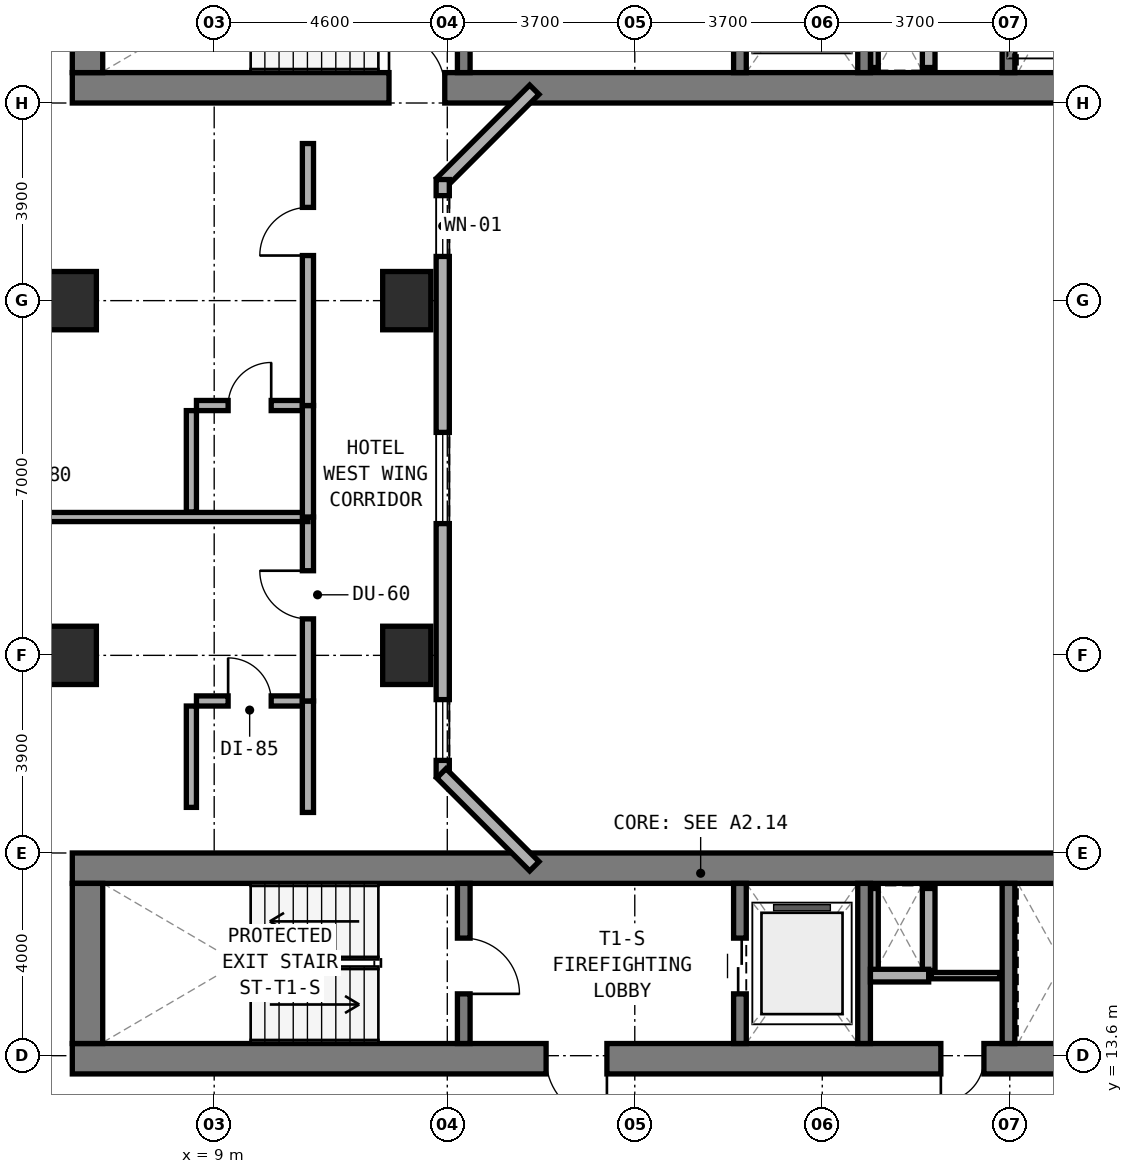
"""IFC4 building model, lengths in metres.
Left out: names, types, materials, properties, quantities, classifications, styles, units other than length and angle.
Written with IfcOpenShell. Run it as: python <this file> out.ifc"""

import sys

from ifc_helpers import new_model, si_unit, direction, frame, frame_2d, origin, origin_2d, place, context, subcontext, project, spatial, rectangle, extrude, element, fill, save


model = new_model("IFC4")
c1 = context("Model", 3, precision=1e-05, world=origin(), true_north=direction((0.0, 1.0)))
c2 = subcontext(c1, "Body", "Model", "MODEL_VIEW")
j1 = project(units=[si_unit("LENGTHUNIT", "METRE"), si_unit("PLANEANGLEUNIT", "RADIAN")], contexts=[c1])
p1 = place(None, origin())
s1 = spatial("IfcSite", under=j1, at=p1, CompositionType="ELEMENT")
p2 = place(p1, origin())
s2 = spatial("IfcBuilding", under=s1, at=p2, CompositionType="ELEMENT")
p3 = place(p2, frame((0.0, 0.0, 52.0)))
s3 = spatial("IfcBuildingStorey", under=s2, at=p3, CompositionType="ELEMENT", Elevation=52.0)
p4 = place(p3, frame((6.2, 32.7, 0.0), z_axis=(0.0, 0.0, 1.0), x_axis=(1.0, 0.0, 0.0)))
e1 = element("IfcWall", 1, at=p4, inside=s3, PredefinedType="SHEAR", context=c2, shape_type="SweptSolid", body=[
    extrude(rectangle(XDim=24.8, YDim=0.6, at=frame_2d((12.4, 0.0))), origin(), (0.0, 0.0, 1.0), 3.5),
])
p5 = place(p4, frame((6.25, 0.0, 0.0)))
e2 = element("IfcOpeningElement", 2, at=p5, cuts=e1, PredefinedType="OPENING", context=c2, shape_type="SweptSolid", body=[
    extrude(rectangle(XDim=1.1, YDim=2.15, at=frame_2d((0.55, 1.075))), frame((0.0, 0.31, 0.0), z_axis=(0.0, -1.0, 0.0), x_axis=(1.0, 0.0, 0.0)), (0.0, 0.0, 1.0), 0.62),
])
p6 = place(p3, frame((6.5, 33.0, 0.0), z_axis=(0.0, 0.0, 1.0), x_axis=(0.0, 1.0, 0.0)))
e3 = element("IfcWall", 3, at=p6, inside=s3, PredefinedType="SHEAR", context=c2, shape_type="SweptSolid", body=[
    extrude(rectangle(XDim=3.16, YDim=0.6, at=frame_2d((1.58, 0.0))), origin(), (0.0, 0.0, 1.0), 3.5),
])
p7 = place(p3, frame((13.925, 33.0, 0.0), z_axis=(0.0, 0.0, 1.0), x_axis=(0.0, 1.0, 0.0)))
e4 = element("IfcWall", 4, at=p7, inside=s3, PredefinedType="STANDARD", context=c2, shape_type="SweptSolid", body=[
    extrude(rectangle(XDim=3.16, YDim=0.25, at=frame_2d((1.58, 0.0))), origin(), (0.0, 0.0, 1.0), 3.22),
])
p8 = place(p7, frame((0.98, 0.0, 0.0)))
e5 = element("IfcOpeningElement", 5, at=p8, cuts=e4, PredefinedType="OPENING", context=c2, shape_type="SweptSolid", body=[
    extrude(rectangle(XDim=1.1, YDim=2.15, at=frame_2d((0.55, 1.075))), frame((0.0, 0.135, 0.0), z_axis=(0.0, -1.0, 0.0), x_axis=(1.0, 0.0, 0.0)), (0.0, 0.0, 1.0), 0.27),
])
p9 = place(p3, frame((19.375, 33.0, 0.0), z_axis=(0.0, 0.0, 1.0), x_axis=(0.0, 1.0, 0.0)))
e6 = element("IfcWall", 6, at=p9, inside=s3, PredefinedType="STANDARD", context=c2, shape_type="SweptSolid", body=[
    extrude(rectangle(XDim=3.16, YDim=0.25, at=frame_2d((1.58, 0.0))), origin(), (0.0, 0.0, 1.0), 3.22),
])
p10 = place(p9, frame((0.98, 0.0, 0.0)))
e7 = element("IfcOpeningElement", 7, at=p10, cuts=e6, PredefinedType="OPENING", context=c2, shape_type="SweptSolid", body=[
    extrude(rectangle(XDim=1.1, YDim=2.15, at=frame_2d((0.55, 1.075))), frame((0.0, 0.135, 0.0), z_axis=(0.0, -1.0, 0.0), x_axis=(1.0, 0.0, 0.0)), (0.0, 0.0, 1.0), 0.27),
])
for number, where, z_axis, x_axis in (
    (8, (21.825, 33.0, 0.0), (0.0, 0.0, 1.0), (0.0, 1.0, 0.0)),
    (9, (24.675, 33.0, 0.0), (0.0, 0.0, 1.0), (0.0, 1.0, 0.0)),
):
    element("IfcWall", number, at=place(p3, frame(where, z_axis=z_axis, x_axis=x_axis)), inside=s3, PredefinedType="STANDARD", context=c2, shape_type="SweptSolid", body=[
        extrude(rectangle(XDim=3.16, YDim=0.25, at=frame_2d((1.58, 0.0))), origin(), (0.0, 0.0, 1.0), 3.22),
    ])
p11 = place(p3, frame((6.2, 13.54, 0.0), z_axis=(0.0, 0.0, 1.0), x_axis=(1.0, 0.0, 0.0)))
e10 = element("IfcWall", 10, at=p11, inside=s3, PredefinedType="SHEAR", context=c2, shape_type="SweptSolid", body=[
    extrude(rectangle(XDim=24.8, YDim=0.6, at=frame_2d((12.4, 0.0))), origin(), (0.0, 0.0, 1.0), 3.5),
])
p12 = place(p11, frame((9.35, 0.0, 0.0)))
e11 = element("IfcOpeningElement", 11, at=p12, cuts=e10, PredefinedType="OPENING", context=c2, shape_type="SweptSolid", body=[
    extrude(rectangle(XDim=1.2, YDim=2.15, at=frame_2d((0.6, 1.075))), frame((0.0, 0.31, 0.0), z_axis=(0.0, -1.0, 0.0), x_axis=(1.0, 0.0, 0.0)), (0.0, 0.0, 1.0), 0.62),
])
p13 = place(p11, frame((17.14, 0.0, 0.0)))
e12 = element("IfcOpeningElement", 12, at=p13, cuts=e10, PredefinedType="OPENING", context=c2, shape_type="SweptSolid", body=[
    extrude(rectangle(XDim=0.85, YDim=2.1, at=frame_2d((0.425, 1.05))), frame((0.0, 0.31, 0.0), z_axis=(0.0, -1.0, 0.0), x_axis=(1.0, 0.0, 0.0)), (0.0, 0.0, 1.0), 0.62),
])
p14 = place(p3, frame((6.2, 17.3, 0.0), z_axis=(0.0, 0.0, 1.0), x_axis=(1.0, 0.0, 0.0)))
e13 = element("IfcWall", 13, at=p14, inside=s3, PredefinedType="SHEAR", context=c2, shape_type="SweptSolid", body=[
    extrude(rectangle(XDim=24.8, YDim=0.6, at=frame_2d((12.4, 0.0))), origin(), (0.0, 0.0, 1.0), 3.5),
])
p15 = place(p3, frame((6.5, 13.84, 0.0), z_axis=(0.0, 0.0, 1.0), x_axis=(0.0, 1.0, 0.0)))
e14 = element("IfcWall", 14, at=p15, inside=s3, PredefinedType="SHEAR", context=c2, shape_type="SweptSolid", body=[
    extrude(rectangle(XDim=3.16, YDim=0.6, at=frame_2d((1.58, 0.0))), origin(), (0.0, 0.0, 1.0), 3.5),
])
p16 = place(p3, frame((13.925, 13.84, 0.0), z_axis=(0.0, 0.0, 1.0), x_axis=(0.0, 1.0, 0.0)))
e15 = element("IfcWall", 15, at=p16, inside=s3, PredefinedType="STANDARD", context=c2, shape_type="SweptSolid", body=[
    extrude(rectangle(XDim=3.16, YDim=0.25, at=frame_2d((1.58, 0.0))), origin(), (0.0, 0.0, 1.0), 3.22),
])
p17 = place(p16, frame((0.98, 0.0, 0.0)))
e16 = element("IfcOpeningElement", 16, at=p17, cuts=e15, PredefinedType="OPENING", context=c2, shape_type="SweptSolid", body=[
    extrude(rectangle(XDim=1.1, YDim=2.15, at=frame_2d((0.55, 1.075))), frame((0.0, 0.135, 0.0), z_axis=(0.0, -1.0, 0.0), x_axis=(1.0, 0.0, 0.0)), (0.0, 0.0, 1.0), 0.27),
])
p18 = place(p3, frame((19.375, 13.84, 0.0), z_axis=(0.0, 0.0, 1.0), x_axis=(0.0, 1.0, 0.0)))
e17 = element("IfcWall", 17, at=p18, inside=s3, PredefinedType="STANDARD", context=c2, shape_type="SweptSolid", body=[
    extrude(rectangle(XDim=3.16, YDim=0.25, at=frame_2d((1.58, 0.0))), origin(), (0.0, 0.0, 1.0), 3.22),
])
p19 = place(p18, frame((0.98, 0.0, 0.0)))
e18 = element("IfcOpeningElement", 18, at=p19, cuts=e17, PredefinedType="OPENING", context=c2, shape_type="SweptSolid", body=[
    extrude(rectangle(XDim=1.1, YDim=2.15, at=frame_2d((0.55, 1.075))), frame((0.0, 0.135, 0.0), z_axis=(0.0, -1.0, 0.0), x_axis=(1.0, 0.0, 0.0)), (0.0, 0.0, 1.0), 0.27),
])
for number, where, z_axis, x_axis in (
    (19, (21.825, 13.84, 0.0), (0.0, 0.0, 1.0), (0.0, 1.0, 0.0)),
    (20, (24.675, 13.84, 0.0), (0.0, 0.0, 1.0), (0.0, 1.0, 0.0)),
):
    element("IfcWall", number, at=place(p3, frame(where, z_axis=z_axis, x_axis=x_axis)), inside=s3, PredefinedType="STANDARD", context=c2, shape_type="SweptSolid", body=[
        extrude(rectangle(XDim=3.16, YDim=0.25, at=frame_2d((1.58, 0.0))), origin(), (0.0, 0.0, 1.0), 3.22),
    ])
for number, where, z_axis, x_axis in (
    (21, (6.2, 21.5, 0.0), (0.0, 0.0, 1.0), (1.0, 0.0, 0.0)),
    (22, (6.2, 28.5, 0.0), (0.0, 0.0, 1.0), (1.0, 0.0, 0.0)),
    (23, (12.8, 21.5, 0.0), (0.0, 0.0, 1.0), (1.0, 0.0, 0.0)),
    (24, (12.8, 28.5, 0.0), (0.0, 0.0, 1.0), (1.0, 0.0, 0.0)),
):
    element("IfcColumn", number, at=place(p3, frame(where, z_axis=z_axis, x_axis=x_axis)), inside=s3, PredefinedType="COLUMN", context=c2, shape_type="SweptSolid", body=[
        extrude(rectangle(XDim=0.95, YDim=1.15, at=origin_2d()), origin(), (0.0, 0.0, 1.0), 3.5),
    ])
p20 = place(p3, frame((15.318, 32.662, 0.0), z_axis=(0.0, 0.0, 1.0), x_axis=(-0.707106781187, -0.707106781187, 0.0)))
e25 = element("IfcWall", 25, at=p20, inside=s3, PredefinedType="STANDARD", context=c2, shape_type="SweptSolid", body=[
    extrude(rectangle(XDim=2.594, YDim=0.26, at=frame_2d((1.297, 0.0))), origin(), (0.0, 0.0, 1.0), 3.22),
])
p21 = place(p3, frame((13.51, 30.89, 0.0), z_axis=(0.0, 0.0, 1.0), x_axis=(0.0, -1.0, 0.0)))
e26 = element("IfcWall", 26, at=p21, inside=s3, PredefinedType="STANDARD", context=c2, shape_type="SweptSolid", body=[
    extrude(rectangle(XDim=11.78, YDim=0.26, at=frame_2d((5.89, 0.0))), origin(), (0.0, 0.0, 1.0), 3.22),
])
p22 = place(p21, frame((0.318, 0.0, 0.85)))
e27 = element("IfcOpeningElement", 27, at=p22, cuts=e26, PredefinedType="OPENING", context=c2, shape_type="SweptSolid", body=[
    extrude(rectangle(XDim=1.2, YDim=1.5, at=frame_2d((0.6, 0.75))), frame((0.0, 0.14, 0.0), z_axis=(0.0, -1.0, 0.0), x_axis=(1.0, 0.0, 0.0)), (0.0, 0.0, 1.0), 0.28),
])
p23 = place(p21, frame((4.99, 0.0, 0.85)))
e28 = element("IfcOpeningElement", 28, at=p23, cuts=e26, PredefinedType="OPENING", context=c2, shape_type="SweptSolid", body=[
    extrude(rectangle(XDim=1.8, YDim=1.5, at=frame_2d((0.9, 0.75))), frame((0.0, 0.14, 0.0), z_axis=(0.0, -1.0, 0.0), x_axis=(1.0, 0.0, 0.0)), (0.0, 0.0, 1.0), 0.28),
])
p24 = place(p21, frame((10.263, 0.0, 0.85)))
e29 = element("IfcOpeningElement", 29, at=p24, cuts=e26, PredefinedType="OPENING", context=c2, shape_type="SweptSolid", body=[
    extrude(rectangle(XDim=1.2, YDim=1.5, at=frame_2d((0.6, 0.75))), frame((0.0, 0.14, 0.0), z_axis=(0.0, -1.0, 0.0), x_axis=(1.0, 0.0, 0.0)), (0.0, 0.0, 1.0), 0.28),
])
p25 = place(p3, frame((13.484, 19.172, 0.0), z_axis=(0.0, 0.0, 1.0), x_axis=(0.707106781187, -0.707106781187, 0.0)))
e30 = element("IfcWall", 30, at=p25, inside=s3, PredefinedType="STANDARD", context=c2, shape_type="SweptSolid", body=[
    extrude(rectangle(XDim=2.594, YDim=0.26, at=frame_2d((1.297, 0.0))), origin(), (0.0, 0.0, 1.0), 3.22),
])
p26 = place(p3, frame((22.03, 33.1, 0.0), z_axis=(0.0, 0.0, 1.0), x_axis=(0.0, 1.0, 0.0)))
e31 = element("IfcWall", 31, at=p26, inside=s3, PredefinedType="PARTITIONING", context=c2, shape_type="SweptSolid", body=[
    extrude(rectangle(XDim=1.62, YDim=0.15, at=frame_2d((0.81, 0.0))), origin(), (0.0, 0.0, 1.0), 3.22),
])
p27 = place(p3, frame((23.1, 33.1, 0.0), z_axis=(0.0, 0.0, 1.0), x_axis=(0.0, 1.0, 0.0)))
e32 = element("IfcWall", 32, at=p27, inside=s3, PredefinedType="SOLIDWALL", context=c2, shape_type="SweptSolid", body=[
    extrude(rectangle(XDim=1.62, YDim=0.25, at=frame_2d((0.81, 0.0))), origin(), (0.0, 0.0, 1.0), 3.22),
])
p28 = place(p3, frame((22.03, 15.28, 0.0), z_axis=(0.0, 0.0, 1.0), x_axis=(0.0, 1.0, 0.0)))
e33 = element("IfcWall", 33, at=p28, inside=s3, PredefinedType="PARTITIONING", context=c2, shape_type="SweptSolid", body=[
    extrude(rectangle(XDim=1.62, YDim=0.15, at=frame_2d((0.81, 0.0))), origin(), (0.0, 0.0, 1.0), 3.22),
])
p29 = place(p3, frame((23.1, 15.28, 0.0), z_axis=(0.0, 0.0, 1.0), x_axis=(0.0, 1.0, 0.0)))
e34 = element("IfcWall", 34, at=p29, inside=s3, PredefinedType="SOLIDWALL", context=c2, shape_type="SweptSolid", body=[
    extrude(rectangle(XDim=1.62, YDim=0.25, at=frame_2d((0.81, 0.0))), origin(), (0.0, 0.0, 1.0), 3.22),
])
p30 = place(p3, frame((21.95, 15.18, 0.0), z_axis=(0.0, 0.0, 1.0), x_axis=(1.0, 0.0, 0.0)))
e35 = element("IfcWall", 35, at=p30, inside=s3, PredefinedType="SOLIDWALL", context=c2, shape_type="SweptSolid", body=[
    extrude(rectangle(XDim=1.15, YDim=0.25, at=frame_2d((0.575, 0.0))), origin(), (0.0, 0.0, 1.0), 3.22),
])
p31 = place(p3, frame((23.15, 15.18, 0.0), z_axis=(0.0, 0.0, 1.0), x_axis=(1.0, 0.0, 0.0)))
e36 = element("IfcWall", 36, at=p31, inside=s3, PredefinedType="PARTITIONING", context=c2, shape_type="SweptSolid", body=[
    extrude(rectangle(XDim=1.35, YDim=0.125, at=frame_2d((0.675, 0.0))), origin(), (0.0, 0.0, 1.0), 3.22),
])
p32 = place(p3, frame((8.65, 20.6, 0.0), z_axis=(0.0, 0.0, 1.0), x_axis=(1.0, 0.0, 0.0)))
e37 = element("IfcWall", 37, at=p32, inside=s3, PredefinedType="PLUMBINGWALL", context=c2, shape_type="SweptSolid", body=[
    extrude(rectangle(XDim=2.1, YDim=0.2, at=frame_2d((1.05, 0.0))), origin(), (0.0, 0.0, 1.0), 3.22),
])
p33 = place(p32, frame((0.625, 0.0, 0.0)))
e38 = element("IfcOpeningElement", 38, at=p33, cuts=e37, PredefinedType="OPENING", context=c2, shape_type="SweptSolid", body=[
    extrude(rectangle(XDim=0.85, YDim=2.1, at=frame_2d((0.425, 1.05))), frame((0.0, 0.11, 0.0), z_axis=(0.0, -1.0, 0.0), x_axis=(1.0, 0.0, 0.0)), (0.0, 0.0, 1.0), 0.22),
])
p34 = place(p3, frame((8.55, 18.5, 0.0), z_axis=(0.0, 0.0, 1.0), x_axis=(0.0, 1.0, 0.0)))
e39 = element("IfcWall", 39, at=p34, inside=s3, PredefinedType="PLUMBINGWALL", context=c2, shape_type="SweptSolid", body=[
    extrude(rectangle(XDim=2.0, YDim=0.2, at=frame_2d((1.0, 0.0))), origin(), (0.0, 0.0, 1.0), 3.22),
])
p35 = place(p3, frame((10.85, 18.4, 0.0), z_axis=(0.0, 0.0, 1.0), x_axis=(0.0, 1.0, 0.0)))
e40 = element("IfcWall", 40, at=p35, inside=s3, PredefinedType="SOLIDWALL", context=c2, shape_type="SweptSolid", body=[
    extrude(rectangle(XDim=2.2, YDim=0.22, at=frame_2d((1.1, 0.0))), origin(), (0.0, 0.0, 1.0), 3.22),
])
p36 = place(p3, frame((10.85, 20.6, 0.0), z_axis=(0.0, 0.0, 1.0), x_axis=(0.0, 1.0, 0.0)))
e41 = element("IfcWall", 41, at=p36, inside=s3, PredefinedType="SOLIDWALL", context=c2, shape_type="SweptSolid", body=[
    extrude(rectangle(XDim=3.63, YDim=0.22, at=frame_2d((1.815, 0.0))), origin(), (0.0, 0.0, 1.0), 2.395),
])
p37 = place(p36, frame((1.62, 0.0, 0.0)))
e42 = element("IfcOpeningElement", 42, at=p37, cuts=e41, PredefinedType="OPENING", context=c2, shape_type="SweptSolid", body=[
    extrude(rectangle(XDim=0.95, YDim=2.1, at=frame_2d((0.475, 1.05))), frame((0.0, 0.12, 0.0), z_axis=(0.0, -1.0, 0.0), x_axis=(1.0, 0.0, 0.0)), (0.0, 0.0, 1.0), 0.24),
])
p38 = place(p3, frame((0.14, 24.23, 0.0), z_axis=(0.0, 0.0, 1.0), x_axis=(1.0, 0.0, 0.0)))
e43 = element("IfcWall", 43, at=p38, inside=s3, PredefinedType="SOLIDWALL", context=c2, shape_type="SweptSolid", body=[
    extrude(rectangle(XDim=10.71, YDim=0.18, at=frame_2d((5.355, 0.0))), origin(), (0.0, 0.0, 1.0), 2.745),
])
p39 = place(p3, frame((8.65, 26.43, 0.0), z_axis=(0.0, 0.0, 1.0), x_axis=(1.0, 0.0, 0.0)))
e44 = element("IfcWall", 44, at=p39, inside=s3, PredefinedType="PLUMBINGWALL", context=c2, shape_type="SweptSolid", body=[
    extrude(rectangle(XDim=2.1, YDim=0.2, at=frame_2d((1.05, 0.0))), origin(), (0.0, 0.0, 1.0), 3.22),
])
p40 = place(p39, frame((0.625, 0.0, 0.0)))
e45 = element("IfcOpeningElement", 45, at=p40, cuts=e44, PredefinedType="OPENING", context=c2, shape_type="SweptSolid", body=[
    extrude(rectangle(XDim=0.85, YDim=2.1, at=frame_2d((0.425, 1.05))), frame((0.0, 0.11, 0.0), z_axis=(0.0, -1.0, 0.0), x_axis=(1.0, 0.0, 0.0)), (0.0, 0.0, 1.0), 0.22),
])
p41 = place(p3, frame((8.55, 24.33, 0.0), z_axis=(0.0, 0.0, 1.0), x_axis=(0.0, 1.0, 0.0)))
e46 = element("IfcWall", 46, at=p41, inside=s3, PredefinedType="PLUMBINGWALL", context=c2, shape_type="SweptSolid", body=[
    extrude(rectangle(XDim=2.0, YDim=0.2, at=frame_2d((1.0, 0.0))), origin(), (0.0, 0.0, 1.0), 3.22),
])
p42 = place(p3, frame((10.85, 24.23, 0.0), z_axis=(0.0, 0.0, 1.0), x_axis=(0.0, 1.0, 0.0)))
e47 = element("IfcWall", 47, at=p42, inside=s3, PredefinedType="SOLIDWALL", context=c2, shape_type="SweptSolid", body=[
    extrude(rectangle(XDim=2.2, YDim=0.22, at=frame_2d((1.1, 0.0))), origin(), (0.0, 0.0, 1.0), 3.22),
])
p43 = place(p3, frame((10.85, 26.43, 0.0), z_axis=(0.0, 0.0, 1.0), x_axis=(0.0, 1.0, 0.0)))
e48 = element("IfcWall", 48, at=p43, inside=s3, PredefinedType="SOLIDWALL", context=c2, shape_type="SweptSolid", body=[
    extrude(rectangle(XDim=5.17, YDim=0.22, at=frame_2d((2.585, 0.0))), origin(), (0.0, 0.0, 1.0), 2.395),
])
p44 = place(p43, frame((2.96, 0.0, 0.0)))
e49 = element("IfcOpeningElement", 49, at=p44, cuts=e48, PredefinedType="OPENING", context=c2, shape_type="SweptSolid", body=[
    extrude(rectangle(XDim=0.95, YDim=2.1, at=frame_2d((0.475, 1.05))), frame((0.0, 0.12, 0.0), z_axis=(0.0, -1.0, 0.0), x_axis=(1.0, 0.0, 0.0)), (0.0, 0.0, 1.0), 0.24),
])
p45 = place(p22, origin())
e50 = element("IfcWindow", 50, at=p45, inside=s3, PartitioningType="SINGLE_PANEL", PredefinedType="WINDOW", context=c2, shape_type="SweptSolid", body=[
    extrude(rectangle(XDim=1.2, YDim=1.5, at=frame_2d((0.6, 0.75))), frame((0.0, 0.03, 0.0), z_axis=(0.0, -1.0, 0.0), x_axis=(1.0, 0.0, 0.0)), (0.0, 0.0, 1.0), 0.06),
])
fill(e27, e50)
p46 = place(p23, origin())
e51 = element("IfcWindow", 51, at=p46, inside=s3, PartitioningType="SINGLE_PANEL", PredefinedType="WINDOW", context=c2, shape_type="SweptSolid", body=[
    extrude(rectangle(XDim=1.8, YDim=1.5, at=frame_2d((0.9, 0.75))), frame((0.0, 0.03, 0.0), z_axis=(0.0, -1.0, 0.0), x_axis=(1.0, 0.0, 0.0)), (0.0, 0.0, 1.0), 0.06),
])
fill(e28, e51)
p47 = place(p24, origin())
e52 = element("IfcWindow", 52, at=p47, inside=s3, PartitioningType="SINGLE_PANEL", PredefinedType="WINDOW", context=c2, shape_type="SweptSolid", body=[
    extrude(rectangle(XDim=1.2, YDim=1.5, at=frame_2d((0.6, 0.75))), frame((0.0, 0.03, 0.0), z_axis=(0.0, -1.0, 0.0), x_axis=(1.0, 0.0, 0.0)), (0.0, 0.0, 1.0), 0.06),
])
fill(e29, e52)
p48 = place(p17, frame((1.1, 0.0, 0.0), z_axis=(0.0, 0.0, 1.0), x_axis=(-1.0, 0.0, 0.0)))
e53 = element("IfcDoor", 53, at=p48, inside=s3, OperationType="SINGLE_SWING_RIGHT", PredefinedType="DOOR", context=c2, shape_type="SweptSolid", body=[
    extrude(rectangle(XDim=1.1, YDim=2.15, at=frame_2d((0.55, 1.075))), frame((0.0, 0.025, 0.0), z_axis=(0.0, -1.0, 0.0), x_axis=(1.0, 0.0, 0.0)), (0.0, 0.0, 1.0), 0.05),
])
fill(e16, e53)
p49 = place(p12, frame((1.2, 0.0, 0.0), z_axis=(0.0, 0.0, 1.0), x_axis=(-1.0, 0.0, 0.0)))
e54 = element("IfcDoor", 54, at=p49, inside=s3, OperationType="SINGLE_SWING_LEFT", PredefinedType="DOOR", context=c2, shape_type="SweptSolid", body=[
    extrude(rectangle(XDim=1.2, YDim=2.15, at=frame_2d((0.6, 1.075))), frame((0.0, 0.025, 0.0), z_axis=(0.0, -1.0, 0.0), x_axis=(1.0, 0.0, 0.0)), (0.0, 0.0, 1.0), 0.05),
])
fill(e11, e54)
p50 = place(p19, origin())
e55 = element("IfcDoor", 55, at=p50, inside=s3, OperationType="DOUBLE_DOOR_SLIDING", PredefinedType="DOOR", context=c2, shape_type="SweptSolid", body=[
    extrude(rectangle(XDim=1.1, YDim=2.15, at=frame_2d((0.55, 1.075))), frame((0.0, 0.025, 0.0), z_axis=(0.0, -1.0, 0.0), x_axis=(1.0, 0.0, 0.0)), (0.0, 0.0, 1.0), 0.05),
])
fill(e18, e55)
p51 = place(p13, frame((0.85, 0.0, 0.0), z_axis=(0.0, 0.0, 1.0), x_axis=(-1.0, 0.0, 0.0)))
e56 = element("IfcDoor", 56, at=p51, inside=s3, OperationType="SINGLE_SWING_RIGHT", PredefinedType="DOOR", context=c2, shape_type="SweptSolid", body=[
    extrude(rectangle(XDim=0.85, YDim=2.1, at=frame_2d((0.425, 1.05))), frame((0.0, 0.025, 0.0), z_axis=(0.0, -1.0, 0.0), x_axis=(1.0, 0.0, 0.0)), (0.0, 0.0, 1.0), 0.05),
])
fill(e12, e56)
p52 = place(p5, origin())
e57 = element("IfcDoor", 57, at=p52, inside=s3, OperationType="SINGLE_SWING_LEFT", PredefinedType="DOOR", context=c2, shape_type="SweptSolid", body=[
    extrude(rectangle(XDim=1.1, YDim=2.15, at=frame_2d((0.55, 1.075))), frame((0.0, 0.025, 0.0), z_axis=(0.0, -1.0, 0.0), x_axis=(1.0, 0.0, 0.0)), (0.0, 0.0, 1.0), 0.05),
])
fill(e2, e57)
p53 = place(p33, origin())
e58 = element("IfcDoor", 58, at=p53, inside=s3, OperationType="SINGLE_SWING_LEFT", PredefinedType="DOOR", context=c2, shape_type="SweptSolid", body=[
    extrude(rectangle(XDim=0.85, YDim=2.1, at=frame_2d((0.425, 1.05))), frame((0.0, 0.025, 0.0), z_axis=(0.0, -1.0, 0.0), x_axis=(1.0, 0.0, 0.0)), (0.0, 0.0, 1.0), 0.05),
])
fill(e38, e58)
p54 = place(p37, origin())
e59 = element("IfcDoor", 59, at=p54, inside=s3, OperationType="SINGLE_SWING_RIGHT", PredefinedType="DOOR", context=c2, shape_type="SweptSolid", body=[
    extrude(rectangle(XDim=0.95, YDim=2.1, at=frame_2d((0.475, 1.05))), frame((0.0, 0.025, 0.0), z_axis=(0.0, -1.0, 0.0), x_axis=(1.0, 0.0, 0.0)), (0.0, 0.0, 1.0), 0.05),
])
fill(e42, e59)
p55 = place(p40, origin())
e60 = element("IfcDoor", 60, at=p55, inside=s3, OperationType="SINGLE_SWING_RIGHT", PredefinedType="DOOR", context=c2, shape_type="SweptSolid", body=[
    extrude(rectangle(XDim=0.85, YDim=2.1, at=frame_2d((0.425, 1.05))), frame((0.0, 0.025, 0.0), z_axis=(0.0, -1.0, 0.0), x_axis=(1.0, 0.0, 0.0)), (0.0, 0.0, 1.0), 0.05),
])
fill(e45, e60)
p56 = place(p44, origin())
e61 = element("IfcDoor", 61, at=p56, inside=s3, OperationType="SINGLE_SWING_LEFT", PredefinedType="DOOR", context=c2, shape_type="SweptSolid", body=[
    extrude(rectangle(XDim=0.95, YDim=2.1, at=frame_2d((0.475, 1.05))), frame((0.0, 0.025, 0.0), z_axis=(0.0, -1.0, 0.0), x_axis=(1.0, 0.0, 0.0)), (0.0, 0.0, 1.0), 0.05),
])
fill(e49, e61)
save(model, sys.argv[1])
